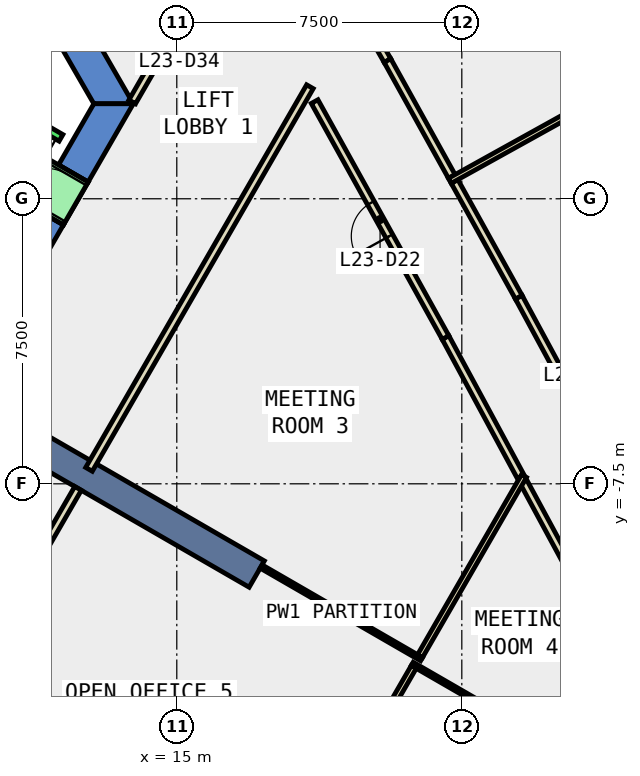
"""IFC4 building model, lengths in metres.
Left out: names, types, materials, properties, quantities, classifications, styles, units other than length and angle.
Written with IfcOpenShell. Run it as: python <this file> out.ifc"""

import sys

from ifc_helpers import new_model, si_unit, direction, frame, frame_2d, origin, place, context, subcontext, project, spatial, polyline, rectangle, outline, extrude, element, fill, save


model = new_model("IFC4")
c1 = context("Model", 3, precision=1e-05, world=origin(), true_north=direction((0.0, 1.0)))
c2 = subcontext(c1, "Body", "Model", "MODEL_VIEW")
j1 = project(units=[si_unit("LENGTHUNIT", "METRE"), si_unit("PLANEANGLEUNIT", "RADIAN")], contexts=[c1])
p1 = place(None, origin())
s1 = spatial("IfcSite", under=j1, at=p1, CompositionType="ELEMENT")
p2 = place(p1, origin())
s2 = spatial("IfcBuilding", under=s1, at=p2, CompositionType="ELEMENT")
p3 = place(p2, frame((0.0, 0.0, 107.6)))
s3 = spatial("IfcBuildingStorey", under=s2, at=p3, CompositionType="ELEMENT", Elevation=107.6)
p4 = place(p3, frame((0.0, 0.0, -0.4)))
e1 = element("IfcWall", 1, at=p4, inside=s3, PredefinedType="SHEAR", context=c2, shape_type="SweptSolid", body=[
    extrude(outline(polyline([(8.517, 11.748), (7.738, 11.298), (12.817, 2.5), (13.856, 2.5), (8.517, 11.748)])), origin(), (0.0, 0.0, 1.0), 4.2),
])
p5 = place(p3, frame((0.0, 0.0, -0.4)))
e2 = element("IfcWall", 2, at=p5, inside=s3, PredefinedType="SHEAR", context=c2, shape_type="SweptSolid", body=[
    extrude(outline(polyline([(12.017, -0.686), (11.238, -0.236), (10.588, -1.361), (11.367, -1.811), (12.017, -0.686)])), origin(), (0.0, 0.0, 1.0), 4.2),
])
p6 = place(p3, frame((0.0, 0.0, -0.4)))
e3 = element("IfcWall", 3, at=p6, inside=s3, PredefinedType="SHEAR", context=c2, shape_type="SweptSolid", body=[
    extrude(outline(polyline([(11.888, 0.89), (12.667, 0.44), (13.856, 2.5), (12.817, 2.5), (11.888, 0.89)])), origin(), (0.0, 0.0, 1.0), 4.2),
])
p7 = place(p3, frame((0.0, 0.0, 3.6)))
e4 = element("IfcWall", 4, at=p7, inside=s3, PredefinedType="SHEAR", context=c2, shape_type="SweptSolid", body=[
    extrude(outline(polyline([(12.667, 0.44), (11.888, 0.89), (11.238, -0.236), (12.017, -0.686), (12.667, 0.44)])), origin(), (0.0, 0.0, 1.0), 0.2),
])
p8 = place(p3, frame((9.31, -5.375, -0.4), z_axis=(0.0, 0.0, 1.0), x_axis=(0.866017533419, -0.500013631625, 0.0)))
e5 = element("IfcWall", 5, at=p8, inside=s3, PredefinedType="SHEAR", context=c2, shape_type="SweptSolid", body=[
    extrude(rectangle(XDim=9.0, YDim=0.8, at=frame_2d((4.5, 0.0))), origin(), (0.0, 0.0, 1.0), 4.2),
])
p9 = place(p3, frame((24.051, -7.315, 0.0), z_axis=(0.0, 0.0, 1.0), x_axis=(-0.475308630647, 0.87981913234, 0.0)))
e6 = element("IfcWall", 6, at=p9, inside=s3, PredefinedType="PARTITIONING", context=c2, shape_type="SweptSolid", body=[
    extrude(rectangle(XDim=4.166, YDim=0.2, at=frame_2d((2.083, 0.0))), origin(), (0.0, 0.0, 1.0), 3.8),
])
p10 = place(p3, frame((22.071, -3.65, 0.0), z_axis=(0.0, 0.0, 1.0), x_axis=(-0.485198988697, 0.874403763354, 0.0)))
e7 = element("IfcWall", 7, at=p10, inside=s3, PredefinedType="PARTITIONING", context=c2, shape_type="SweptSolid", body=[
    extrude(rectangle(XDim=7.098, YDim=0.2, at=frame_2d((3.549, 0.0))), origin(), (0.0, 0.0, 1.0), 3.8),
])
p11 = place(p10, frame((3.049, 0.0, 0.0)))
e8 = element("IfcOpeningElement", 8, at=p11, cuts=e7, PredefinedType="OPENING", context=c2, shape_type="SweptSolid", body=[
    extrude(rectangle(XDim=1.0, YDim=2.1, at=frame_2d((0.5, 1.05))), frame((0.0, 0.11, 0.0), z_axis=(0.0, -1.0, 0.0), x_axis=(1.0, 0.0, 0.0)), (0.0, 0.0, 1.0), 0.22),
])
p12 = place(p3, frame((25.446, -9.896, 0.0), z_axis=(0.0, 0.0, 1.0), x_axis=(-0.475427182652, 0.879755076141, 0.0)))
e9 = element("IfcWall", 9, at=p12, inside=s3, PredefinedType="PARTITIONING", context=c2, shape_type="SweptSolid", body=[
    extrude(rectangle(XDim=2.785, YDim=0.2, at=frame_2d((1.393, 0.0))), origin(), (0.0, 0.0, 1.0), 3.8),
])
p13 = place(p3, frame((22.309, 0.456, 0.0), z_axis=(0.0, 0.0, 1.0), x_axis=(0.484982854201, -0.87452365956, 0.0)))
e10 = element("IfcWall", 10, at=p13, inside=s3, PredefinedType="PARTITIONING", context=c2, shape_type="SweptSolid", body=[
    extrude(rectangle(XDim=3.487, YDim=0.2, at=frame_2d((1.743, 0.0))), origin(), (0.0, 0.0, 1.0), 3.8),
])
p14 = place(p3, frame((24.0, -2.593, 0.0), z_axis=(0.0, 0.0, 1.0), x_axis=(0.475480817472, -0.879726089312, 0.0)))
e11 = element("IfcWall", 11, at=p14, inside=s3, PredefinedType="PARTITIONING", context=c2, shape_type="SweptSolid", body=[
    extrude(rectangle(XDim=7.05, YDim=0.2, at=frame_2d((3.525, 0.0))), origin(), (0.0, 0.0, 1.0), 3.8),
])
p15 = place(p14, frame((3.1, 0.0, 0.0)))
e12 = element("IfcOpeningElement", 12, at=p15, cuts=e11, PredefinedType="OPENING", context=c2, shape_type="SweptSolid", body=[
    extrude(rectangle(XDim=1.0, YDim=2.1, at=frame_2d((0.5, 1.05))), frame((0.0, 0.11, 0.0), z_axis=(0.0, -1.0, 0.0), x_axis=(1.0, 0.0, 0.0)), (0.0, 0.0, 1.0), 0.22),
])
p16 = place(p3, frame((16.98, 9.89, 0.0), z_axis=(0.0, 0.0, 1.0), x_axis=(0.495123170501, -0.868822793228, 0.0)))
e13 = element("IfcWall", 13, at=p16, inside=s3, PredefinedType="PARTITIONING", context=c2, shape_type="SweptSolid", body=[
    extrude(rectangle(XDim=7.198, YDim=0.2, at=frame_2d((3.599, 0.0))), origin(), (0.0, 0.0, 1.0), 3.8),
])
p17 = place(p16, frame((3.099, 0.0, 0.0)))
e14 = element("IfcOpeningElement", 14, at=p17, cuts=e13, PredefinedType="OPENING", context=c2, shape_type="SweptSolid", body=[
    extrude(rectangle(XDim=1.0, YDim=2.1, at=frame_2d((0.5, 1.05))), frame((0.0, 0.11, 0.0), z_axis=(0.0, -1.0, 0.0), x_axis=(1.0, 0.0, 0.0)), (0.0, 0.0, 1.0), 0.22),
])
p18 = place(p3, frame((20.544, 3.636, 0.0), z_axis=(0.0, 0.0, 1.0), x_axis=(0.485250552989, -0.874375148792, 0.0)))
e15 = element("IfcWall", 15, at=p18, inside=s3, PredefinedType="PARTITIONING", context=c2, shape_type="SweptSolid", body=[
    extrude(rectangle(XDim=3.487, YDim=0.2, at=frame_2d((1.744, 0.0))), origin(), (0.0, 0.0, 1.0), 3.8),
])
p19 = place(p3, frame((13.827, 2.55, 0.0), z_axis=(0.0, 0.0, 1.0), x_axis=(0.500070719615, 0.865984569946, 0.0)))
e16 = element("IfcWall", 16, at=p19, inside=s3, PredefinedType="PARTITIONING", context=c2, shape_type="SweptSolid", body=[
    extrude(rectangle(XDim=4.935, YDim=0.2, at=frame_2d((2.468, 0.0))), origin(), (0.0, 0.0, 1.0), 3.8),
])
p20 = place(p19, frame((1.968, 0.0, 0.0)))
e17 = element("IfcOpeningElement", 17, at=p20, cuts=e16, PredefinedType="OPENING", context=c2, shape_type="SweptSolid", body=[
    extrude(rectangle(XDim=1.0, YDim=2.1, at=frame_2d((0.5, 1.05))), frame((0.0, 0.11, 0.0), z_axis=(0.0, -1.0, 0.0), x_axis=(1.0, 0.0, 0.0)), (0.0, 0.0, 1.0), 0.22),
])
p21 = place(p19, frame((3.068, 0.0, 0.0)))
e18 = element("IfcOpeningElement", 18, at=p21, cuts=e16, PredefinedType="OPENING", context=c2, shape_type="SweptSolid", body=[
    extrude(rectangle(XDim=1.0, YDim=2.1, at=frame_2d((0.5, 1.05))), frame((0.0, 0.11, 0.0), z_axis=(0.0, -1.0, 0.0), x_axis=(1.0, 0.0, 0.0)), (0.0, 0.0, 1.0), 0.22),
])
p22 = place(p3, frame((12.401, -7.621, 0.0), z_axis=(0.0, 0.0, 1.0), x_axis=(-0.499983724212, -0.866034800411, 0.0)))
e19 = element("IfcWall", 19, at=p22, inside=s3, PredefinedType="PARTITIONING", context=c2, shape_type="SweptSolid", body=[
    extrude(rectangle(XDim=9.302, YDim=0.2, at=frame_2d((4.651, 0.0))), origin(), (0.0, 0.0, 1.0), 3.8),
])
p23 = place(p3, frame((18.503, 2.949, 0.0), z_axis=(0.0, 0.0, 1.0), x_axis=(-0.49997390151, -0.86604047123, 0.0)))
e20 = element("IfcWall", 20, at=p23, inside=s3, PredefinedType="PARTITIONING", context=c2, shape_type="SweptSolid", body=[
    extrude(rectangle(XDim=11.626, YDim=0.2, at=frame_2d((5.813, 0.0))), origin(), (0.0, 0.0, 1.0), 3.8),
])
p24 = place(p3, frame((17.219, -9.676, 0.0), z_axis=(0.0, 0.0, 1.0), x_axis=(0.86598459596, -0.500070674565, 0.0)))
e21 = element("IfcWall", 21, at=p24, inside=s3, PredefinedType="PARTITIONING", context=c2, shape_type="SweptSolid", body=[
    extrude(rectangle(XDim=4.875, YDim=0.1, at=frame_2d((2.438, 0.0))), origin(), (0.0, 0.0, 1.0), 3.8),
])
p25 = place(p3, frame((21.236, -12.319, 0.0), z_axis=(0.0, 0.0, 1.0), x_axis=(-0.500016488359, -0.866015884017, 0.0)))
e22 = element("IfcWall", 22, at=p25, inside=s3, PredefinedType="PARTITIONING", context=c2, shape_type="SweptSolid", body=[
    extrude(rectangle(XDim=5.702, YDim=0.15, at=frame_2d((2.851, 0.0))), origin(), (0.0, 0.0, 1.0), 3.8),
])
p26 = place(p3, frame((24.137, -7.294, 0.0), z_axis=(0.0, 0.0, 1.0), x_axis=(-0.500001804394, -0.866024362014, 0.0)))
e23 = element("IfcWall", 23, at=p26, inside=s3, PredefinedType="PARTITIONING", context=c2, shape_type="SweptSolid", body=[
    extrude(rectangle(XDim=5.472, YDim=0.15, at=frame_2d((2.736, 0.0))), origin(), (0.0, 0.0, 1.0), 3.8),
])
p27 = place(p3, frame((21.196, -12.238, 0.0), z_axis=(0.0, 0.0, 1.0), x_axis=(0.866023145199, -0.500003911965, 0.0)))
e24 = element("IfcWall", 24, at=p27, inside=s3, PredefinedType="PARTITIONING", context=c2, shape_type="SweptSolid", body=[
    extrude(rectangle(XDim=8.71, YDim=0.1, at=frame_2d((4.355, 0.0))), origin(), (0.0, 0.0, 1.0), 3.8),
])
p28 = place(p3, frame((22.185, 0.473, 0.0), z_axis=(0.0, 0.0, 1.0), x_axis=(0.874372498137, 0.485255329184, 0.0)))
e25 = element("IfcWall", 25, at=p28, inside=s3, PredefinedType="PARTITIONING", context=c2, shape_type="SweptSolid", body=[
    extrude(rectangle(XDim=6.9, YDim=0.15, at=frame_2d((3.45, 0.0))), origin(), (0.0, 0.0, 1.0), 3.8),
])
p29 = place(p3, frame((9.788, 2.853, 0.0), z_axis=(0.0, 0.0, 1.0), x_axis=(0.865998541277, -0.500046524342, 0.0)))
e26 = element("IfcWall", 26, at=p29, inside=s3, PredefinedType="STANDARD", context=c2, shape_type="SweptSolid", body=[
    extrude(rectangle(XDim=2.5, YDim=0.2, at=frame_2d((1.25, 0.0))), origin(), (0.0, 0.0, 1.0), 3.8),
])
p30 = place(p3, frame((11.498, -0.385, 0.0), z_axis=(0.0, 0.0, 1.0), x_axis=(0.500221244143, 0.865897630733, 0.0)))
e27 = element("IfcWall", 27, at=p30, inside=s3, PredefinedType="STANDARD", context=c2, shape_type="SweptSolid", body=[
    extrude(rectangle(XDim=1.299, YDim=1.2, at=frame_2d((0.65, 0.0))), origin(), (0.0, 0.0, 1.0), 2.4),
])
p31 = place(p30, frame((0.1, 0.0, 0.0)))
e28 = element("IfcOpeningElement", 28, at=p31, cuts=e27, PredefinedType="OPENING", context=c2, shape_type="SweptSolid", body=[
    extrude(rectangle(XDim=1.1, YDim=2.3, at=frame_2d((0.55, 1.15))), frame((0.0, 0.61, 0.0), z_axis=(0.0, -1.0, 0.0), x_axis=(1.0, 0.0, 0.0)), (0.0, 0.0, 1.0), 1.22),
])
p32 = place(p11, origin())
e29 = element("IfcDoor", 29, at=p32, inside=s3, OperationType="SINGLE_SWING_RIGHT", PredefinedType="DOOR", context=c2, shape_type="SweptSolid", body=[
    extrude(rectangle(XDim=1.0, YDim=2.1, at=frame_2d((0.5, 1.05))), frame((0.0, 0.025, 0.0), z_axis=(0.0, -1.0, 0.0), x_axis=(1.0, 0.0, 0.0)), (0.0, 0.0, 1.0), 0.05),
])
fill(e8, e29)
p33 = place(p31, origin())
e30 = element("IfcDoor", 30, at=p33, inside=s3, OperationType="SLIDING_TO_LEFT", PredefinedType="DOOR", context=c2, shape_type="SweptSolid", body=[
    extrude(rectangle(XDim=1.1, YDim=2.3, at=frame_2d((0.55, 1.15))), frame((0.0, 0.025, 0.0), z_axis=(0.0, -1.0, 0.0), x_axis=(1.0, 0.0, 0.0)), (0.0, 0.0, 1.0), 0.05),
])
fill(e28, e30)
save(model, sys.argv[1])
